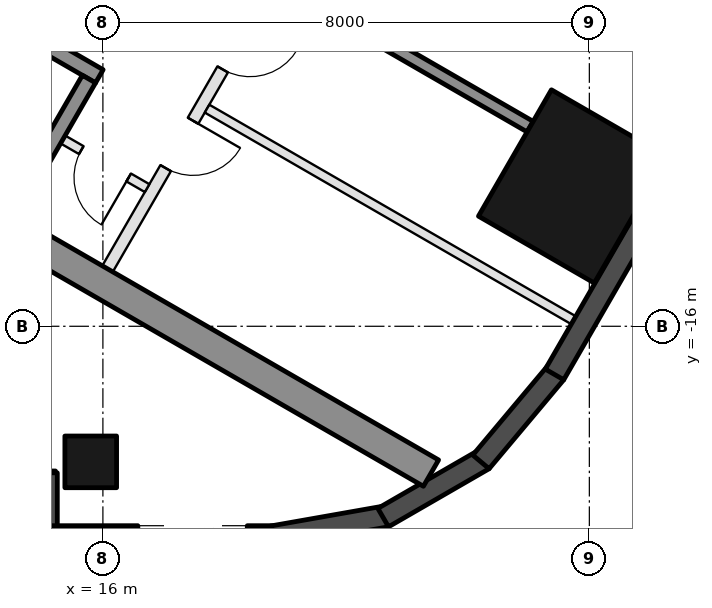
"""IFC4 building model, lengths in metres.
Left out: names, types, materials, properties, quantities, classifications, styles, units other than length and angle.
Written with IfcOpenShell. Run it as: python <this file> out.ifc"""

import sys

from ifc_helpers import new_model, si_unit, direction, frame, frame_2d, origin, origin_2d, place, context, subcontext, project, spatial, rectangle, hollow_rectangle, extrude, element, fill, save


model = new_model("IFC4")
c1 = context("Model", 3, precision=1e-05, world=origin(), true_north=direction((0.0, 1.0)))
c2 = subcontext(c1, "Body", "Model", "MODEL_VIEW")
j1 = project(units=[si_unit("LENGTHUNIT", "METRE"), si_unit("PLANEANGLEUNIT", "RADIAN")], contexts=[c1])
p1 = place(None, origin())
s1 = spatial("IfcSite", under=j1, at=p1, CompositionType="ELEMENT")
p2 = place(p1, origin())
s2 = spatial("IfcBuilding", under=s1, at=p2, CompositionType="ELEMENT")
p3 = place(p2, frame((0.0, 0.0, 161.4)))
s3 = spatial("IfcBuildingStorey", under=s2, at=p3, CompositionType="ELEMENT", Elevation=161.4)
p4 = place(p3, frame((15.8, -18.23, 0.0), z_axis=(0.0, 0.0, 1.0), x_axis=(-1.0, 0.0, 0.0)))
e1 = element("IfcColumn", 1, at=p4, inside=s3, PredefinedType="COLUMN", context=c2, shape_type="SweptSolid", body=[
    extrude(hollow_rectangle(XDim=0.85, YDim=0.85, WallThickness=0.04, at=origin_2d()), origin(), (0.0, 0.0, 1.0), 3.7),
])
p5 = place(p3, frame((23.729, -13.7, 0.0), z_axis=(0.0, 0.0, 1.0), x_axis=(0.5, 0.866025403784, 0.0)))
e2 = element("IfcColumn", 2, at=p5, inside=s3, PredefinedType="COLUMN", context=c2, shape_type="SweptSolid", body=[
    extrude(hollow_rectangle(XDim=2.4, YDim=2.2, WallThickness=0.06, at=origin_2d()), origin(), (0.0, 0.0, 1.0), 3.7),
])
p6 = place(p3, frame((8.48, -18.555, 0.0), z_axis=(0.0, 0.0, 1.0), x_axis=(1.0, 0.0, 0.0)))
e3 = element("IfcWall", 3, at=p6, inside=s3, PredefinedType="SOLIDWALL", context=c2, shape_type="SweptSolid", body=[
    extrude(rectangle(XDim=6.74, YDim=0.35, at=frame_2d((3.37, 0.0))), origin(), (0.0, 0.0, 1.0), 3.55),
])
p7 = place(p6, frame((0.32, 0.0, 0.0)))
e4 = element("IfcOpeningElement", 4, at=p7, cuts=e3, PredefinedType="OPENING", context=c2, shape_type="SweptSolid", body=[
    extrude(rectangle(XDim=2.4, YDim=2.4, at=frame_2d((1.2, 1.2))), frame((0.0, 0.185, 0.0), z_axis=(0.0, -1.0, 0.0), x_axis=(1.0, 0.0, 0.0)), (0.0, 0.0, 1.0), 0.37),
])
p8 = place(p6, frame((3.02, 0.0, 0.3)))
e5 = element("IfcOpeningElement", 5, at=p8, cuts=e3, PredefinedType="OPENING", context=c2, shape_type="SweptSolid", body=[
    extrude(rectangle(XDim=2.9, YDim=2.65, at=frame_2d((1.45, 1.325))), frame((0.0, 0.185, 0.0), z_axis=(0.0, -1.0, 0.0), x_axis=(1.0, 0.0, 0.0)), (0.0, 0.0, 1.0), 0.37),
])
p9 = place(p3, frame((15.075, -18.41, 0.0), z_axis=(0.0, 0.0, 1.0), x_axis=(0.0, -1.0, 0.0)))
e6 = element("IfcWall", 6, at=p9, inside=s3, PredefinedType="SOLIDWALL", context=c2, shape_type="SweptSolid", body=[
    extrude(rectangle(XDim=1.22, YDim=0.35, at=frame_2d((0.61, 0.0))), origin(), (0.0, 0.0, 1.0), 3.55),
])
p10 = place(p3, frame((14.9, -19.455, 0.0), z_axis=(0.0, 0.0, 1.0), x_axis=(1.0, 0.0, 0.0)))
e7 = element("IfcWall", 7, at=p10, inside=s3, PredefinedType="SOLIDWALL", context=c2, shape_type="SweptSolid", body=[
    extrude(rectangle(XDim=3.916, YDim=0.35, at=frame_2d((1.958, 0.0))), origin(), (0.0, 0.0, 1.0), 3.55),
])
p11 = place(p10, frame((1.675, 0.0, 0.3)))
e8 = element("IfcOpeningElement", 8, at=p11, cuts=e7, PredefinedType="OPENING", context=c2, shape_type="SweptSolid", body=[
    extrude(rectangle(XDim=1.8, YDim=2.65, at=frame_2d((0.9, 1.325))), frame((0.0, 0.185, 0.0), z_axis=(0.0, -1.0, 0.0), x_axis=(1.0, 0.0, 0.0)), (0.0, 0.0, 1.0), 0.37),
])
p12 = place(p3, frame((18.785, -19.458, 0.0), z_axis=(0.0, 0.0, 1.0), x_axis=(0.984798995425, 0.173697837091, 0.0)))
e9 = element("IfcWall", 9, at=p12, inside=s3, PredefinedType="SOLIDWALL", context=c2, shape_type="SweptSolid", body=[
    extrude(rectangle(XDim=1.91, YDim=0.35, at=frame_2d((0.955, 0.0))), origin(), (0.0, 0.0, 1.0), 3.55),
])
for number, where, z_axis, x_axis in (
    (10, (20.61, -19.147, 0.0), (0.0, 0.0, 1.0), (0.866, 0.5, 0.0)),
    (11, (22.217, -18.231, 0.0), (0.0, 0.0, 1.0), (0.643, 0.766, 0.0)),
):
    element("IfcWall", number, at=place(p3, frame(where, z_axis=z_axis, x_axis=x_axis)), inside=s3, PredefinedType="SOLIDWALL", context=c2, shape_type="SweptSolid", body=[
        extrude(rectangle(XDim=1.91, YDim=0.35, at=frame_2d((0.955, 0.0))), origin(), (0.0, 0.0, 1.0), 3.55),
    ])
p13 = place(p3, frame((23.427, -16.792, 0.0), z_axis=(0.0, 0.0, 1.0), x_axis=(0.500018773155, 0.866014564827, 0.0)))
e12 = element("IfcWall", 12, at=p13, inside=s3, PredefinedType="SOLIDWALL", context=c2, shape_type="SweptSolid", body=[
    extrude(rectangle(XDim=5.658, YDim=0.35, at=frame_2d((2.829, 0.0))), origin(), (0.0, 0.0, 1.0), 3.55),
])
p14 = place(p3, frame((8.547, -10.997, 0.0), z_axis=(0.0, 0.0, 1.0), x_axis=(0.866025009528, -0.500000682871, 0.0)))
e13 = element("IfcWall", 13, at=p14, inside=s3, PredefinedType="SHEAR", context=c2, shape_type="SweptSolid", body=[
    extrude(rectangle(XDim=14.837, YDim=0.5, at=frame_2d((7.418, 0.0))), origin(), (0.0, 0.0, 1.0), 3.5),
])
p15 = place(p3, frame((10.356, -8.664, 0.0), z_axis=(0.0, 0.0, 1.0), x_axis=(0.866028629588, -0.499994412703, 0.0)))
e14 = element("IfcWall", 14, at=p15, inside=s3, PredefinedType="SHEAR", context=c2, shape_type="SweptSolid", body=[
    extrude(rectangle(XDim=6.45, YDim=0.25, at=frame_2d((3.225, 0.0))), origin(), (0.0, 0.0, 1.0), 3.5),
])
p16 = place(p15, frame((0.3, 0.0, 0.0)))
e15 = element("IfcOpeningElement", 15, at=p16, cuts=e14, PredefinedType="OPENING", context=c2, shape_type="SweptSolid", body=[
    extrude(rectangle(XDim=1.0, YDim=2.1, at=frame_2d((0.5, 1.05))), frame((0.0, 0.135, 0.0), z_axis=(0.0, -1.0, 0.0), x_axis=(1.0, 0.0, 0.0)), (0.0, 0.0, 1.0), 0.27),
])
p17 = place(p3, frame((14.496, -14.143, 0.0), z_axis=(0.0, 0.0, 1.0), x_axis=(0.500062241894, 0.865989465428, 0.0)))
e16 = element("IfcWall", 16, at=p17, inside=s3, PredefinedType="SHEAR", context=c2, shape_type="SweptSolid", body=[
    extrude(rectangle(XDim=2.55, YDim=0.25, at=frame_2d((1.275, 0.0))), origin(), (0.0, 0.0, 1.0), 3.5),
])
p18 = place(p3, frame((20.567, -11.297, 0.0), z_axis=(0.0, 0.0, 1.0), x_axis=(0.866055327414, -0.49994816717, 0.0)))
e17 = element("IfcWall", 17, at=p18, inside=s3, PredefinedType="SHEAR", context=c2, shape_type="SweptSolid", body=[
    extrude(rectangle(XDim=2.84, YDim=0.2, at=frame_2d((1.42, 0.0))), origin(), (0.0, 0.0, 1.0), 3.5),
])
p19 = place(p3, frame((16.076, -15.055, 0.0), z_axis=(0.0, 0.0, 1.0), x_axis=(0.499995103361, 0.866028230842, 0.0)))
e18 = element("IfcWall", 18, at=p19, inside=s3, PredefinedType="PARTITIONING", context=c2, shape_type="SweptSolid", body=[
    extrude(rectangle(XDim=5.4, YDim=0.2, at=frame_2d((2.7, 0.0))), origin(), (0.0, 0.0, 1.0), 3.5),
])
p20 = place(p19, frame((1.913, 0.0, 0.0)))
e19 = element("IfcOpeningElement", 19, at=p20, cuts=e18, PredefinedType="OPENING", context=c2, shape_type="SweptSolid", body=[
    extrude(rectangle(XDim=0.9, YDim=2.1, at=frame_2d((0.45, 1.05))), frame((0.0, 0.11, 0.0), z_axis=(0.0, -1.0, 0.0), x_axis=(1.0, 0.0, 0.0)), (0.0, 0.0, 1.0), 0.22),
])
p21 = place(p19, frame((3.788, 0.0, 0.0)))
e20 = element("IfcOpeningElement", 20, at=p21, cuts=e18, PredefinedType="OPENING", context=c2, shape_type="SweptSolid", body=[
    extrude(rectangle(XDim=0.9, YDim=2.1, at=frame_2d((0.45, 1.05))), frame((0.0, 0.11, 0.0), z_axis=(0.0, -1.0, 0.0), x_axis=(1.0, 0.0, 0.0)), (0.0, 0.0, 1.0), 0.22),
])
p22 = place(p3, frame((15.342, -12.928, 0.0), z_axis=(0.0, 0.0, 1.0), x_axis=(0.865989903783, -0.500061482766, 0.0)))
e21 = element("IfcWall", 21, at=p22, inside=s3, PredefinedType="PARTITIONING", context=c2, shape_type="SweptSolid", body=[
    extrude(rectangle(XDim=1.6, YDim=0.15, at=frame_2d((0.8, 0.0))), origin(), (0.0, 0.0, 1.0), 3.5),
])
p23 = place(p22, frame((0.35, 0.0, 0.0)))
e22 = element("IfcOpeningElement", 22, at=p23, cuts=e21, PredefinedType="OPENING", context=c2, shape_type="SweptSolid", body=[
    extrude(rectangle(XDim=0.9, YDim=2.1, at=frame_2d((0.45, 1.05))), frame((0.0, 0.085, 0.0), z_axis=(0.0, -1.0, 0.0), x_axis=(1.0, 0.0, 0.0)), (0.0, 0.0, 1.0), 0.17),
])
p24 = place(p3, frame((17.713, -12.42, 0.0), z_axis=(0.0, 0.0, 1.0), x_axis=(0.866016523273, -0.500015381182, 0.0)))
e23 = element("IfcWall", 23, at=p24, inside=s3, PredefinedType="PARTITIONING", context=c2, shape_type="SweptSolid", body=[
    extrude(rectangle(XDim=6.95, YDim=0.15, at=frame_2d((3.475, 0.0))), origin(), (0.0, 0.0, 1.0), 3.5),
])
p25 = place(p23, frame((0.9, 0.0, 0.0), z_axis=(0.0, 0.0, 1.0), x_axis=(-1.0, 0.0, 0.0)))
e24 = element("IfcDoor", 24, at=p25, inside=s3, OperationType="SINGLE_SWING_LEFT", PredefinedType="DOOR", context=c2, shape_type="SweptSolid", body=[
    extrude(rectangle(XDim=0.9, YDim=2.1, at=frame_2d((0.45, 1.05))), frame((0.0, 0.025, 0.0), z_axis=(0.0, -1.0, 0.0), x_axis=(1.0, 0.0, 0.0)), (0.0, 0.0, 1.0), 0.05),
])
fill(e22, e24)
p26 = place(p20, frame((0.9, 0.0, 0.0), z_axis=(0.0, 0.0, 1.0), x_axis=(-1.0, 0.0, 0.0)))
e25 = element("IfcDoor", 25, at=p26, inside=s3, OperationType="SINGLE_SWING_LEFT", PredefinedType="DOOR", context=c2, shape_type="SweptSolid", body=[
    extrude(rectangle(XDim=0.9, YDim=2.1, at=frame_2d((0.45, 1.05))), frame((0.0, 0.025, 0.0), z_axis=(0.0, -1.0, 0.0), x_axis=(1.0, 0.0, 0.0)), (0.0, 0.0, 1.0), 0.05),
])
fill(e19, e25)
p27 = place(p21, frame((0.9, 0.0, 0.0), z_axis=(0.0, 0.0, 1.0), x_axis=(-1.0, 0.0, 0.0)))
e26 = element("IfcDoor", 26, at=p27, inside=s3, OperationType="SINGLE_SWING_LEFT", PredefinedType="DOOR", context=c2, shape_type="SweptSolid", body=[
    extrude(rectangle(XDim=0.9, YDim=2.1, at=frame_2d((0.45, 1.05))), frame((0.0, 0.025, 0.0), z_axis=(0.0, -1.0, 0.0), x_axis=(1.0, 0.0, 0.0)), (0.0, 0.0, 1.0), 0.05),
])
fill(e20, e26)
save(model, sys.argv[1])
